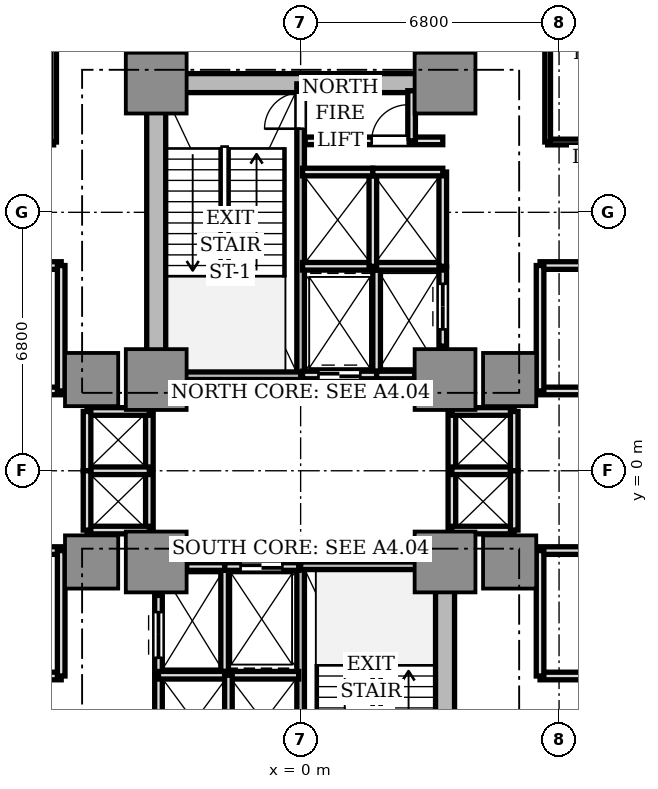
"""IFC4 building model, lengths in metres.
Left out: names, types, materials, properties, quantities, classifications, styles, units other than length and angle.
Written with IfcOpenShell. Run it as: python <this file> out.ifc"""

import sys

from ifc_helpers import new_model, si_unit, direction, frame, frame_2d, origin, origin_2d, place, context, subcontext, project, spatial, rectangle, extrude, source, transform, mapped, element, fill, save


model = new_model("IFC4")
c1 = context("Model", 3, precision=1e-05, world=origin(), true_north=direction((0.0, 1.0)))
c2 = subcontext(c1, "Body", "Model", "MODEL_VIEW")
j1 = project(units=[si_unit("LENGTHUNIT", "METRE"), si_unit("PLANEANGLEUNIT", "RADIAN")], contexts=[c1])
p1 = place(None, origin())
s1 = spatial("IfcSite", under=j1, at=p1, CompositionType="ELEMENT")
p2 = place(p1, origin())
s2 = spatial("IfcBuilding", under=s1, at=p2, CompositionType="ELEMENT")
p3 = place(p2, frame((0.0, 0.0, 14.1)))
s3 = spatial("IfcBuildingStorey", under=s2, at=p3, CompositionType="ELEMENT", Elevation=14.1)
p4 = place(p3, frame((-3.55, 10.2, 0.0), z_axis=(0.0, 0.0, 1.0), x_axis=(1.0, 0.0, 0.0)))
e1 = element("IfcWall", 1, at=p4, inside=s3, PredefinedType="SHEAR", context=c2, shape_type="SweptSolid", body=[
    extrude(rectangle(XDim=7.1, YDim=0.5, at=frame_2d((3.55, 0.0))), origin(), (0.0, 0.0, 1.0), 4.18),
])
for number, where, z_axis, x_axis in (
    (2, (-3.8, 2.85, 0.0), (0.0, 0.0, 1.0), (0.0, 1.0, 0.0)),
    (3, (3.8, -9.75, 0.0), (0.0, 0.0, 1.0), (0.0, 1.0, 0.0)),
):
    element("IfcWall", number, at=place(p3, frame(where, z_axis=z_axis, x_axis=x_axis)), inside=s3, PredefinedType="SHEAR", context=c2, shape_type="SweptSolid", body=[
        extrude(rectangle(XDim=6.9, YDim=0.5, at=frame_2d((3.45, 0.0))), origin(), (0.0, 0.0, 1.0), 4.18),
    ])
m1 = source(origin(), c2, "Body", "SweptSolid", [
    extrude(rectangle(XDim=1.6, YDim=1.6, at=origin_2d()), origin(), (0.0, 0.0, 1.0), 4.18),
])
for number, where, z_axis, x_axis in (
    (4, (-3.8, 2.4, 0.0), (0.0, 0.0, 1.0), (1.0, 0.0, 0.0)),
    (5, (3.8, 2.4, 0.0), (0.0, 0.0, 1.0), (1.0, 0.0, 0.0)),
    (6, (-3.8, 10.2, 0.0), (0.0, 0.0, 1.0), (1.0, 0.0, 0.0)),
    (7, (3.8, 10.2, 0.0), (0.0, 0.0, 1.0), (1.0, 0.0, 0.0)),
    (8, (-3.8, -2.4, 0.0), (0.0, 0.0, 1.0), (1.0, 0.0, 0.0)),
    (9, (3.8, -2.4, 0.0), (0.0, 0.0, 1.0), (1.0, 0.0, 0.0)),
):
    element("IfcColumn", number, at=place(p3, frame(where, z_axis=z_axis, x_axis=x_axis)), inside=s3, PredefinedType="COLUMN", context=c2, shape_type="MappedRepresentation", body=[
        mapped(m1, transform((0.0, 0.0, 0.0), scale=1.0)),
    ])
m2 = source(origin(), c2, "Body", "SweptSolid", [
    extrude(rectangle(XDim=1.4, YDim=1.4, at=origin_2d()), origin(), (0.0, 0.0, 1.0), 4.18),
])
for number, where, z_axis, x_axis in (
    (10, (5.5, 2.4, 0.0), (0.0, 0.0, 1.0), (1.0, 0.0, 0.0)),
    (11, (-5.5, 2.4, 0.0), (0.0, 0.0, 1.0), (1.0, 0.0, 0.0)),
    (12, (5.5, -2.4, 0.0), (0.0, 0.0, 1.0), (1.0, 0.0, 0.0)),
    (13, (-5.5, -2.4, 0.0), (0.0, 0.0, 1.0), (1.0, 0.0, 0.0)),
):
    element("IfcColumn", number, at=place(p3, frame(where, z_axis=z_axis, x_axis=x_axis)), inside=s3, PredefinedType="COLUMN", context=c2, shape_type="MappedRepresentation", body=[
        mapped(m2, transform((0.0, 0.0, 0.0), scale=1.0)),
    ])
p5 = place(p3, frame((0.0, 2.5, 0.0), z_axis=(0.0, 0.0, 1.0), x_axis=(0.0, 1.0, 0.0)))
e14 = element("IfcWall", 14, at=p5, inside=s3, PredefinedType="SOLIDWALL", context=c2, shape_type="SweptSolid", body=[
    extrude(rectangle(XDim=7.68, YDim=0.2, at=frame_2d((3.84, 0.0))), origin(), (0.0, 0.0, 1.0), 4.18),
])
p6 = place(p5, frame((6.5, 0.0, 0.0)))
e15 = element("IfcOpeningElement", 15, at=p6, cuts=e14, PredefinedType="OPENING", context=c2, shape_type="SweptSolid", body=[
    extrude(rectangle(XDim=0.95, YDim=2.15, at=frame_2d((0.475, 1.075))), frame((0.0, 0.11, 0.0), z_axis=(0.0, -1.0, 0.0), x_axis=(1.0, 0.0, 0.0)), (0.0, 0.0, 1.0), 0.22),
])
p7 = place(p3, frame((-3.72, 2.5, 0.0), z_axis=(0.0, 0.0, 1.0), x_axis=(1.0, 0.0, 0.0)))
e16 = element("IfcWall", 16, at=p7, inside=s3, PredefinedType="SOLIDWALL", context=c2, shape_type="SweptSolid", body=[
    extrude(rectangle(XDim=3.72, YDim=0.2, at=frame_2d((1.86, 0.0))), origin(), (0.0, 0.0, 1.0), 4.18),
])
p8 = place(p3, frame((0.0, -10.18, 0.0), z_axis=(0.0, 0.0, 1.0), x_axis=(0.0, 1.0, 0.0)))
e17 = element("IfcWall", 17, at=p8, inside=s3, PredefinedType="SOLIDWALL", context=c2, shape_type="SweptSolid", body=[
    extrude(rectangle(XDim=7.68, YDim=0.2, at=frame_2d((3.84, 0.0))), origin(), (0.0, 0.0, 1.0), 4.18),
])
p9 = place(p8, frame((0.28, 0.0, 0.0)))
e18 = element("IfcOpeningElement", 18, at=p9, cuts=e17, PredefinedType="OPENING", context=c2, shape_type="SweptSolid", body=[
    extrude(rectangle(XDim=1.1, YDim=2.15, at=frame_2d((0.55, 1.075))), frame((0.0, 0.11, 0.0), z_axis=(0.0, -1.0, 0.0), x_axis=(1.0, 0.0, 0.0)), (0.0, 0.0, 1.0), 0.22),
])
p10 = place(p3, frame((0.0, -2.5, 0.0), z_axis=(0.0, 0.0, 1.0), x_axis=(1.0, 0.0, 0.0)))
e19 = element("IfcWall", 19, at=p10, inside=s3, PredefinedType="SOLIDWALL", context=c2, shape_type="SweptSolid", body=[
    extrude(rectangle(XDim=3.72, YDim=0.2, at=frame_2d((1.86, 0.0))), origin(), (0.0, 0.0, 1.0), 4.18),
])
p11 = place(p3, frame((2.0, 2.5, 0.0), z_axis=(0.0, 0.0, 1.0), x_axis=(0.0, 1.0, 0.0)))
e20 = element("IfcWall", 20, at=p11, inside=s3, PredefinedType="SOLIDWALL", context=c2, shape_type="SweptSolid", body=[
    extrude(rectangle(XDim=2.78, YDim=0.2, at=frame_2d((1.39, 0.0))), origin(), (0.0, 0.0, 1.0), 3.73),
])
p12 = place(p3, frame((0.05, 2.52, 0.0), z_axis=(0.0, 0.0, 1.0), x_axis=(1.0, 0.0, 0.0)))
e21 = element("IfcWall", 21, at=p12, inside=s3, PredefinedType="SOLIDWALL", context=c2, shape_type="SweptSolid", body=[
    extrude(rectangle(XDim=1.95, YDim=0.2, at=frame_2d((0.975, 0.0))), origin(), (0.0, 0.0, 1.0), 3.73),
])
p13 = place(p12, frame((0.42, 0.0, 0.0)))
e22 = element("IfcOpeningElement", 22, at=p13, cuts=e21, PredefinedType="OPENING", context=c2, shape_type="SweptSolid", body=[
    extrude(rectangle(XDim=1.1, YDim=2.2, at=frame_2d((0.55, 1.1))), frame((0.0, 0.11, 0.0), z_axis=(0.0, -1.0, 0.0), x_axis=(1.0, 0.0, 0.0)), (0.0, 0.0, 1.0), 0.22),
])
p14 = place(p3, frame((-2.0, -5.28, 0.0), z_axis=(0.0, 0.0, 1.0), x_axis=(0.0, 1.0, 0.0)))
e23 = element("IfcWall", 23, at=p14, inside=s3, PredefinedType="SOLIDWALL", context=c2, shape_type="SweptSolid", body=[
    extrude(rectangle(XDim=2.78, YDim=0.2, at=frame_2d((1.39, 0.0))), origin(), (0.0, 0.0, 1.0), 3.73),
])
p15 = place(p3, frame((-2.0, -2.52, 0.0), z_axis=(0.0, 0.0, 1.0), x_axis=(1.0, 0.0, 0.0)))
e24 = element("IfcWall", 24, at=p15, inside=s3, PredefinedType="SOLIDWALL", context=c2, shape_type="SweptSolid", body=[
    extrude(rectangle(XDim=1.95, YDim=0.2, at=frame_2d((0.975, 0.0))), origin(), (0.0, 0.0, 1.0), 3.73),
])
p16 = place(p15, frame((0.42, 0.0, 0.0)))
e25 = element("IfcOpeningElement", 25, at=p16, cuts=e24, PredefinedType="OPENING", context=c2, shape_type="SweptSolid", body=[
    extrude(rectangle(XDim=1.1, YDim=2.2, at=frame_2d((0.55, 1.1))), frame((0.0, 0.11, 0.0), z_axis=(0.0, -1.0, 0.0), x_axis=(1.0, 0.0, 0.0)), (0.0, 0.0, 1.0), 0.22),
])
p17 = place(p3, frame((2.0, 2.52, 0.0), z_axis=(0.0, 0.0, 1.0), x_axis=(1.0, 0.0, 0.0)))
e26 = element("IfcWall", 26, at=p17, inside=s3, PredefinedType="SOLIDWALL", context=c2, shape_type="SweptSolid", body=[
    extrude(rectangle(XDim=1.0, YDim=0.2, at=frame_2d((0.5, 0.0))), origin(), (0.0, 0.0, 1.0), 3.73),
])
p18 = place(p3, frame((3.74, 3.28, 0.0), z_axis=(0.0, 0.0, 1.0), x_axis=(0.0, 1.0, 0.0)))
e27 = element("IfcWall", 27, at=p18, inside=s3, PredefinedType="SOLIDWALL", context=c2, shape_type="SweptSolid", body=[
    extrude(rectangle(XDim=2.08, YDim=0.2, at=frame_2d((1.04, 0.0))), origin(), (0.0, 0.0, 1.0), 3.73),
])
p19 = place(p18, frame((0.44, 0.0, 0.0)))
e28 = element("IfcOpeningElement", 28, at=p19, cuts=e27, PredefinedType="OPENING", context=c2, shape_type="SweptSolid", body=[
    extrude(rectangle(XDim=1.2, YDim=2.2, at=frame_2d((0.6, 1.1))), frame((0.0, 0.11, 0.0), z_axis=(0.0, -1.0, 0.0), x_axis=(1.0, 0.0, 0.0)), (0.0, 0.0, 1.0), 0.22),
])
p20 = place(p3, frame((-3.0, -2.52, 0.0), z_axis=(0.0, 0.0, 1.0), x_axis=(1.0, 0.0, 0.0)))
e29 = element("IfcWall", 29, at=p20, inside=s3, PredefinedType="SOLIDWALL", context=c2, shape_type="SweptSolid", body=[
    extrude(rectangle(XDim=1.0, YDim=0.2, at=frame_2d((0.5, 0.0))), origin(), (0.0, 0.0, 1.0), 3.73),
])
p21 = place(p3, frame((-3.74, -5.36, 0.0), z_axis=(0.0, 0.0, 1.0), x_axis=(0.0, 1.0, 0.0)))
e30 = element("IfcWall", 30, at=p21, inside=s3, PredefinedType="SOLIDWALL", context=c2, shape_type="SweptSolid", body=[
    extrude(rectangle(XDim=2.08, YDim=0.2, at=frame_2d((1.04, 0.0))), origin(), (0.0, 0.0, 1.0), 3.73),
])
p22 = place(p21, frame((0.44, 0.0, 0.0)))
e31 = element("IfcOpeningElement", 31, at=p22, cuts=e30, PredefinedType="OPENING", context=c2, shape_type="SweptSolid", body=[
    extrude(rectangle(XDim=1.2, YDim=2.2, at=frame_2d((0.6, 1.1))), frame((0.0, 0.11, 0.0), z_axis=(0.0, -1.0, 0.0), x_axis=(1.0, 0.0, 0.0)), (0.0, 0.0, 1.0), 0.22),
])
p23 = place(p3, frame((0.05, 5.38, 0.0), z_axis=(0.0, 0.0, 1.0), x_axis=(1.0, 0.0, 0.0)))
e32 = element("IfcWall", 32, at=p23, inside=s3, PredefinedType="SOLIDWALL", context=c2, shape_type="SweptSolid", body=[
    extrude(rectangle(XDim=3.69, YDim=0.2, at=frame_2d((1.845, 0.0))), origin(), (0.0, 0.0, 1.0), 3.73),
])
p24 = place(p3, frame((1.9, 5.38, 0.0), z_axis=(0.0, 0.0, 1.0), x_axis=(0.0, 1.0, 0.0)))
e33 = element("IfcWall", 33, at=p24, inside=s3, PredefinedType="SOLIDWALL", context=c2, shape_type="SweptSolid", body=[
    extrude(rectangle(XDim=2.48, YDim=0.2, at=frame_2d((1.24, 0.0))), origin(), (0.0, 0.0, 1.0), 3.73),
])
p25 = place(p3, frame((0.05, 7.86, 0.0), z_axis=(0.0, 0.0, 1.0), x_axis=(1.0, 0.0, 0.0)))
e34 = element("IfcWall", 34, at=p25, inside=s3, PredefinedType="SOLIDWALL", context=c2, shape_type="SweptSolid", body=[
    extrude(rectangle(XDim=1.85, YDim=0.2, at=frame_2d((0.925, 0.0))), origin(), (0.0, 0.0, 1.0), 3.73),
])
p26 = place(p3, frame((3.74, 5.38, 0.0), z_axis=(0.0, 0.0, 1.0), x_axis=(0.0, 1.0, 0.0)))
e35 = element("IfcWall", 35, at=p26, inside=s3, PredefinedType="SOLIDWALL", context=c2, shape_type="SweptSolid", body=[
    extrude(rectangle(XDim=2.48, YDim=0.2, at=frame_2d((1.24, 0.0))), origin(), (0.0, 0.0, 1.0), 3.73),
])
p27 = place(p3, frame((1.9, 7.86, 0.0), z_axis=(0.0, 0.0, 1.0), x_axis=(1.0, 0.0, 0.0)))
e36 = element("IfcWall", 36, at=p27, inside=s3, PredefinedType="SOLIDWALL", context=c2, shape_type="SweptSolid", body=[
    extrude(rectangle(XDim=1.84, YDim=0.2, at=frame_2d((0.92, 0.0))), origin(), (0.0, 0.0, 1.0), 3.73),
])
p28 = place(p3, frame((-3.74, -7.86, 0.0), z_axis=(0.0, 0.0, 1.0), x_axis=(0.0, 1.0, 0.0)))
e37 = element("IfcWall", 37, at=p28, inside=s3, PredefinedType="SOLIDWALL", context=c2, shape_type="SweptSolid", body=[
    extrude(rectangle(XDim=2.48, YDim=0.2, at=frame_2d((1.24, 0.0))), origin(), (0.0, 0.0, 1.0), 3.73),
])
p29 = place(p3, frame((-3.74, -5.38, 0.0), z_axis=(0.0, 0.0, 1.0), x_axis=(1.0, 0.0, 0.0)))
e38 = element("IfcWall", 38, at=p29, inside=s3, PredefinedType="SOLIDWALL", context=c2, shape_type="SweptSolid", body=[
    extrude(rectangle(XDim=3.69, YDim=0.2, at=frame_2d((1.845, 0.0))), origin(), (0.0, 0.0, 1.0), 3.73),
])
p30 = place(p3, frame((-1.9, -7.86, 0.0), z_axis=(0.0, 0.0, 1.0), x_axis=(0.0, 1.0, 0.0)))
e39 = element("IfcWall", 39, at=p30, inside=s3, PredefinedType="SOLIDWALL", context=c2, shape_type="SweptSolid", body=[
    extrude(rectangle(XDim=2.48, YDim=0.2, at=frame_2d((1.24, 0.0))), origin(), (0.0, 0.0, 1.0), 3.73),
])
p31 = place(p3, frame((3.98, -1.56, 0.0), z_axis=(0.0, 0.0, 1.0), x_axis=(0.0, 1.0, 0.0)))
e40 = element("IfcWall", 40, at=p31, inside=s3, PredefinedType="SOLIDWALL", context=c2, shape_type="SweptSolid", body=[
    extrude(rectangle(XDim=3.12, YDim=0.2, at=frame_2d((1.56, 0.0))), origin(), (0.0, 0.0, 1.0), 3.25),
])
for number, where, z_axis, x_axis in (
    (41, (3.98, 1.56, 0.0), (0.0, 0.0, 1.0), (1.0, 0.0, 0.0)),
    (42, (3.98, -1.56, 0.0), (0.0, 0.0, 1.0), (1.0, 0.0, 0.0)),
    (43, (3.98, 0.0, 0.0), (0.0, 0.0, 1.0), (1.0, 0.0, 0.0)),
):
    element("IfcWall", number, at=place(p3, frame(where, z_axis=z_axis, x_axis=x_axis)), inside=s3, PredefinedType="SOLIDWALL", context=c2, shape_type="SweptSolid", body=[
        extrude(rectangle(XDim=1.64, YDim=0.2, at=frame_2d((0.82, 0.0))), origin(), (0.0, 0.0, 1.0), 3.73),
    ])
for number, where, z_axis, x_axis in (
    (44, (5.62, 0.0, 0.0), (0.0, 0.0, 1.0), (0.0, 1.0, 0.0)),
    (45, (5.62, -1.56, 0.0), (0.0, 0.0, 1.0), (0.0, 1.0, 0.0)),
):
    element("IfcWall", number, at=place(p3, frame(where, z_axis=z_axis, x_axis=x_axis)), inside=s3, PredefinedType="SOLIDWALL", context=c2, shape_type="SweptSolid", body=[
        extrude(rectangle(XDim=1.56, YDim=0.2, at=frame_2d((0.78, 0.0))), origin(), (0.0, 0.0, 1.0), 3.73),
    ])
p32 = place(p3, frame((-3.98, -1.56, 0.0), z_axis=(0.0, 0.0, 1.0), x_axis=(0.0, 1.0, 0.0)))
e46 = element("IfcWall", 46, at=p32, inside=s3, PredefinedType="SOLIDWALL", context=c2, shape_type="SweptSolid", body=[
    extrude(rectangle(XDim=3.12, YDim=0.2, at=frame_2d((1.56, 0.0))), origin(), (0.0, 0.0, 1.0), 3.25),
])
for number, where, z_axis, x_axis in (
    (47, (-5.62, 1.56, 0.0), (0.0, 0.0, 1.0), (1.0, 0.0, 0.0)),
    (48, (-5.62, -1.56, 0.0), (0.0, 0.0, 1.0), (1.0, 0.0, 0.0)),
    (49, (-5.62, 0.0, 0.0), (0.0, 0.0, 1.0), (1.0, 0.0, 0.0)),
):
    element("IfcWall", number, at=place(p3, frame(where, z_axis=z_axis, x_axis=x_axis)), inside=s3, PredefinedType="SOLIDWALL", context=c2, shape_type="SweptSolid", body=[
        extrude(rectangle(XDim=1.64, YDim=0.2, at=frame_2d((0.82, 0.0))), origin(), (0.0, 0.0, 1.0), 3.73),
    ])
for number, where, z_axis, x_axis in (
    (50, (-5.62, 0.0, 0.0), (0.0, 0.0, 1.0), (0.0, 1.0, 0.0)),
    (51, (-5.62, -1.56, 0.0), (0.0, 0.0, 1.0), (0.0, 1.0, 0.0)),
):
    element("IfcWall", number, at=place(p3, frame(where, z_axis=z_axis, x_axis=x_axis)), inside=s3, PredefinedType="SOLIDWALL", context=c2, shape_type="SweptSolid", body=[
        extrude(rectangle(XDim=1.56, YDim=0.2, at=frame_2d((0.78, 0.0))), origin(), (0.0, 0.0, 1.0), 3.73),
    ])
p33 = place(p3, frame((0.12, 8.68, 0.0), z_axis=(0.0, 0.0, 1.0), x_axis=(1.0, 0.0, 0.0)))
e52 = element("IfcWall", 52, at=p33, inside=s3, PredefinedType="SOLIDWALL", context=c2, shape_type="SweptSolid", body=[
    extrude(rectangle(XDim=3.62, YDim=0.2, at=frame_2d((1.81, 0.0))), origin(), (0.0, 0.0, 1.0), 3.73),
])
p34 = place(p33, frame((1.75, 0.0, 0.0)))
e53 = element("IfcOpeningElement", 53, at=p34, cuts=e52, PredefinedType="OPENING", context=c2, shape_type="SweptSolid", body=[
    extrude(rectangle(XDim=0.95, YDim=2.15, at=frame_2d((0.475, 1.075))), frame((0.0, 0.11, 0.0), z_axis=(0.0, -1.0, 0.0), x_axis=(1.0, 0.0, 0.0)), (0.0, 0.0, 1.0), 0.22),
])
p35 = place(p3, frame((2.92, 8.68, 0.0), z_axis=(0.0, 0.0, 1.0), x_axis=(0.0, 1.0, 0.0)))
e54 = element("IfcWall", 54, at=p35, inside=s3, PredefinedType="SOLIDWALL", context=c2, shape_type="SweptSolid", body=[
    extrude(rectangle(XDim=1.32, YDim=0.2, at=frame_2d((0.66, 0.0))), origin(), (0.0, 0.0, 1.0), 3.73),
])
for number, where, z_axis, x_axis in (
    (55, (6.3, 5.4, 0.0), (0.0, 0.0, 1.0), (1.0, 0.0, 0.0)),
    (56, (6.3, 2.1, 0.0), (0.0, 0.0, 1.0), (1.0, 0.0, 0.0)),
):
    element("IfcWall", number, at=place(p3, frame(where, z_axis=z_axis, x_axis=x_axis)), inside=s3, PredefinedType="SOLIDWALL", context=c2, shape_type="SweptSolid", body=[
        extrude(rectangle(XDim=18.9, YDim=0.2, at=frame_2d((9.45, 0.0))), origin(), (0.0, 0.0, 1.0), 3.25),
    ])
p36 = place(p3, frame((6.3, 2.1, 0.0), z_axis=(0.0, 0.0, 1.0), x_axis=(0.0, 1.0, 0.0)))
e57 = element("IfcWall", 57, at=p36, inside=s3, PredefinedType="SOLIDWALL", context=c2, shape_type="SweptSolid", body=[
    extrude(rectangle(XDim=3.3, YDim=0.2, at=frame_2d((1.65, 0.0))), origin(), (0.0, 0.0, 1.0), 3.73),
])
for number, where, z_axis, x_axis in (
    (58, (-25.2, 5.4, 0.0), (0.0, 0.0, 1.0), (1.0, 0.0, 0.0)),
    (59, (-25.2, 2.1, 0.0), (0.0, 0.0, 1.0), (1.0, 0.0, 0.0)),
):
    element("IfcWall", number, at=place(p3, frame(where, z_axis=z_axis, x_axis=x_axis)), inside=s3, PredefinedType="SOLIDWALL", context=c2, shape_type="SweptSolid", body=[
        extrude(rectangle(XDim=18.9, YDim=0.2, at=frame_2d((9.45, 0.0))), origin(), (0.0, 0.0, 1.0), 3.25),
    ])
p37 = place(p3, frame((-6.3, 2.1, 0.0), z_axis=(0.0, 0.0, 1.0), x_axis=(0.0, 1.0, 0.0)))
e60 = element("IfcWall", 60, at=p37, inside=s3, PredefinedType="SOLIDWALL", context=c2, shape_type="SweptSolid", body=[
    extrude(rectangle(XDim=3.3, YDim=0.2, at=frame_2d((1.65, 0.0))), origin(), (0.0, 0.0, 1.0), 3.73),
])
for number, where, z_axis, x_axis in (
    (61, (6.3, -2.1, 0.0), (0.0, 0.0, 1.0), (1.0, 0.0, 0.0)),
    (62, (6.3, -5.4, 0.0), (0.0, 0.0, 1.0), (1.0, 0.0, 0.0)),
):
    element("IfcWall", number, at=place(p3, frame(where, z_axis=z_axis, x_axis=x_axis)), inside=s3, PredefinedType="SOLIDWALL", context=c2, shape_type="SweptSolid", body=[
        extrude(rectangle(XDim=18.9, YDim=0.2, at=frame_2d((9.45, 0.0))), origin(), (0.0, 0.0, 1.0), 3.25),
    ])
p38 = place(p3, frame((6.3, -5.4, 0.0), z_axis=(0.0, 0.0, 1.0), x_axis=(0.0, 1.0, 0.0)))
e63 = element("IfcWall", 63, at=p38, inside=s3, PredefinedType="SOLIDWALL", context=c2, shape_type="SweptSolid", body=[
    extrude(rectangle(XDim=3.3, YDim=0.2, at=frame_2d((1.65, 0.0))), origin(), (0.0, 0.0, 1.0), 3.73),
])
for number, where, z_axis, x_axis in (
    (64, (-25.2, -2.1, 0.0), (0.0, 0.0, 1.0), (1.0, 0.0, 0.0)),
    (65, (-25.2, -5.4, 0.0), (0.0, 0.0, 1.0), (1.0, 0.0, 0.0)),
):
    element("IfcWall", number, at=place(p3, frame(where, z_axis=z_axis, x_axis=x_axis)), inside=s3, PredefinedType="SOLIDWALL", context=c2, shape_type="SweptSolid", body=[
        extrude(rectangle(XDim=18.9, YDim=0.2, at=frame_2d((9.45, 0.0))), origin(), (0.0, 0.0, 1.0), 3.25),
    ])
p39 = place(p3, frame((-6.3, -5.4, 0.0), z_axis=(0.0, 0.0, 1.0), x_axis=(0.0, 1.0, 0.0)))
e66 = element("IfcWall", 66, at=p39, inside=s3, PredefinedType="SOLIDWALL", context=c2, shape_type="SweptSolid", body=[
    extrude(rectangle(XDim=3.3, YDim=0.2, at=frame_2d((1.65, 0.0))), origin(), (0.0, 0.0, 1.0), 3.73),
])
p40 = place(p3, frame((-10.05, 8.65, 0.0), z_axis=(0.0, 0.0, 1.0), x_axis=(1.0, 0.0, 0.0)))
e67 = element("IfcWall", 67, at=p40, inside=s3, PredefinedType="PARTITIONING", context=c2, shape_type="SweptSolid", body=[
    extrude(rectangle(XDim=3.55, YDim=0.15, at=frame_2d((1.775, 0.0))), origin(), (0.0, 0.0, 1.0), 3.73),
])
p41 = place(p40, frame((1.15, 0.0, 0.0)))
e68 = element("IfcOpeningElement", 68, at=p41, cuts=e67, PredefinedType="OPENING", context=c2, shape_type="SweptSolid", body=[
    extrude(rectangle(XDim=0.95, YDim=2.15, at=frame_2d((0.475, 1.075))), frame((0.0, 0.085, 0.0), z_axis=(0.0, -1.0, 0.0), x_axis=(1.0, 0.0, 0.0)), (0.0, 0.0, 1.0), 0.17),
])
p42 = place(p3, frame((-6.5, 8.65, 0.0), z_axis=(0.0, 0.0, 1.0), x_axis=(0.0, 1.0, 0.0)))
e69 = element("IfcWall", 69, at=p42, inside=s3, PredefinedType="PARTITIONING", context=c2, shape_type="SweptSolid", body=[
    extrude(rectangle(XDim=5.05, YDim=0.15, at=frame_2d((2.525, 0.0))), origin(), (0.0, 0.0, 1.0), 3.73),
])
p43 = place(p3, frame((6.5, 8.65, 0.0), z_axis=(0.0, 0.0, 1.0), x_axis=(1.0, 0.0, 0.0)))
e70 = element("IfcWall", 70, at=p43, inside=s3, PredefinedType="PARTITIONING", context=c2, shape_type="SweptSolid", body=[
    extrude(rectangle(XDim=3.55, YDim=0.15, at=frame_2d((1.775, 0.0))), origin(), (0.0, 0.0, 1.0), 3.73),
])
p44 = place(p43, frame((1.15, 0.0, 0.0)))
e71 = element("IfcOpeningElement", 71, at=p44, cuts=e70, PredefinedType="OPENING", context=c2, shape_type="SweptSolid", body=[
    extrude(rectangle(XDim=0.95, YDim=2.15, at=frame_2d((0.475, 1.075))), frame((0.0, 0.085, 0.0), z_axis=(0.0, -1.0, 0.0), x_axis=(1.0, 0.0, 0.0)), (0.0, 0.0, 1.0), 0.17),
])
p45 = place(p3, frame((6.5, 8.65, 0.0), z_axis=(0.0, 0.0, 1.0), x_axis=(0.0, 1.0, 0.0)))
e72 = element("IfcWall", 72, at=p45, inside=s3, PredefinedType="PARTITIONING", context=c2, shape_type="SweptSolid", body=[
    extrude(rectangle(XDim=5.05, YDim=0.15, at=frame_2d((2.525, 0.0))), origin(), (0.0, 0.0, 1.0), 3.73),
])
m3 = source(origin(), c2, "Body", "SweptSolid", [
    extrude(rectangle(XDim=1.1, YDim=0.05, at=origin_2d()), origin(), (0.0, 0.0, 1.0), 2.2),
])
p46 = place(p13, frame((0.55, 0.0, 0.0)))
e73 = element("IfcDoor", 73, at=p46, inside=s3, OperationType="DOUBLE_DOOR_SLIDING", PredefinedType="DOOR", context=c2, shape_type="MappedRepresentation", body=[
    mapped(m3, transform((0.0, 0.0, 0.0), scale=1.0)),
])
fill(e22, e73)
p47 = place(p16, frame((0.55, 0.0, 0.0)))
e74 = element("IfcDoor", 74, at=p47, inside=s3, OperationType="DOUBLE_DOOR_SLIDING", PredefinedType="DOOR", context=c2, shape_type="MappedRepresentation", body=[
    mapped(m3, transform((0.0, 0.0, 0.0), scale=1.0)),
])
fill(e25, e74)
m4 = source(origin(), c2, "Body", "SweptSolid", [
    extrude(rectangle(XDim=1.2, YDim=0.05, at=origin_2d()), origin(), (0.0, 0.0, 1.0), 2.2),
])
p48 = place(p19, frame((0.6, 0.0, 0.0)))
e75 = element("IfcDoor", 75, at=p48, inside=s3, OperationType="DOUBLE_DOOR_SLIDING", PredefinedType="DOOR", context=c2, shape_type="MappedRepresentation", body=[
    mapped(m4, transform((0.0, 0.0, 0.0), scale=1.0)),
])
fill(e28, e75)
p49 = place(p22, frame((0.6, 0.0, 0.0)))
e76 = element("IfcDoor", 76, at=p49, inside=s3, OperationType="DOUBLE_DOOR_SLIDING", PredefinedType="DOOR", context=c2, shape_type="MappedRepresentation", body=[
    mapped(m4, transform((0.0, 0.0, 0.0), scale=1.0)),
])
fill(e31, e76)
m5 = source(origin(), c2, "Body", "SweptSolid", [
    extrude(rectangle(XDim=0.95, YDim=0.05, at=origin_2d()), origin(), (0.0, 0.0, 1.0), 2.15),
])
p50 = place(p6, frame((0.475, 0.0, 0.0)))
e77 = element("IfcDoor", 77, at=p50, inside=s3, OperationType="SINGLE_SWING_LEFT", PredefinedType="DOOR", context=c2, shape_type="MappedRepresentation", body=[
    mapped(m5, transform((0.0, 0.0, 0.0), scale=1.0)),
])
fill(e15, e77)
p51 = place(p34, frame((0.475, 0.0, 0.0)))
e78 = element("IfcDoor", 78, at=p51, inside=s3, OperationType="SINGLE_SWING_RIGHT", PredefinedType="DOOR", context=c2, shape_type="MappedRepresentation", body=[
    mapped(m5, transform((0.0, 0.0, 0.0), scale=1.0)),
])
fill(e53, e78)
save(model, sys.argv[1])
